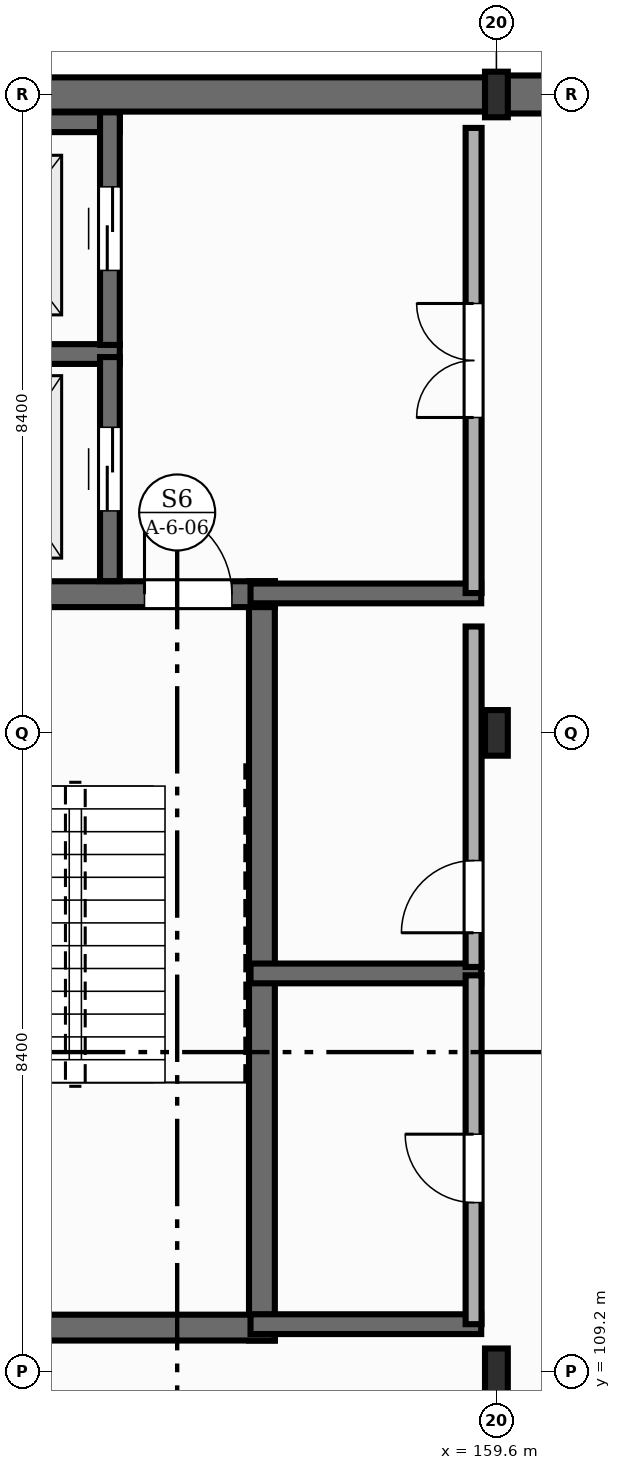
"""IFC4 building model, lengths in metres.
Left out: names, types, materials, properties, quantities, classifications, styles, units other than length and angle.
Written with IfcOpenShell. Run it as: python <this file> out.ifc"""

import sys

from ifc_helpers import new_model, si_unit, direction, frame, frame_2d, origin, origin_2d, place, context, subcontext, project, spatial, rectangle, i_section, extrude, element, fill, save


model = new_model("IFC4")
c1 = context("Model", 3, precision=1e-05, world=origin(), true_north=direction((0.0, 1.0)))
c2 = subcontext(c1, "Body", "Model", "MODEL_VIEW")
j1 = project(units=[si_unit("LENGTHUNIT", "METRE"), si_unit("PLANEANGLEUNIT", "RADIAN")], contexts=[c1])
p1 = place(None, origin())
s1 = spatial("IfcSite", under=j1, at=p1, CompositionType="ELEMENT")
p2 = place(p1, origin())
s2 = spatial("IfcBuilding", under=s1, at=p2, CompositionType="ELEMENT")
p3 = place(p2, frame((0.0, 0.0, -4.5)))
s3 = spatial("IfcBuildingStorey", under=s2, at=p3, CompositionType="ELEMENT", Elevation=-4.5)
for number, where, z_axis, x_axis in (
    (1, (159.6, 109.2, 0.0), (0.0, 0.0, 1.0), (1.0, 0.0, 0.0)),
    (2, (159.6, 117.6, 0.0), (0.0, 0.0, 1.0), (1.0, 0.0, 0.0)),
    (3, (159.6, 126.0, 0.0), (0.0, 0.0, 1.0), (1.0, 0.0, 0.0)),
):
    element("IfcColumn", number, at=place(p3, frame(where, z_axis=z_axis, x_axis=x_axis)), inside=s3, PredefinedType="COLUMN", context=c2, shape_type="SweptSolid", body=[
        extrude(i_section(OverallWidth=0.3, OverallDepth=0.6, WebThickness=0.015, FlangeThickness=0.03, FilletRadius=0.027, at=origin_2d()), origin(), (0.0, 0.0, 1.0), 4.5),
    ])
p4 = place(p3, frame((167.992, 126.0, 0.0), z_axis=(0.0, 0.0, 1.0), x_axis=(-1.0, 0.0, 0.0)))
e4 = element("IfcWall", 4, at=p4, inside=s3, PredefinedType="USERDEFINED", context=c2, shape_type="SweptSolid", body=[
    extrude(rectangle(XDim=8.384, YDim=0.5, at=frame_2d((4.192, 0.0))), origin(), (0.0, 0.0, 1.0), 4.25),
])
p5 = place(p3, frame((159.592, 126.0, 0.0), z_axis=(0.0, 0.0, 1.0), x_axis=(-1.0, 0.0, 0.0)))
e5 = element("IfcWall", 5, at=p5, inside=s3, PredefinedType="USERDEFINED", context=c2, shape_type="SweptSolid", body=[
    extrude(rectangle(XDim=8.384, YDim=0.45, at=frame_2d((4.192, 0.0))), origin(), (0.0, 0.0, 1.0), 4.25),
])
p6 = place(p3, frame((156.515, 109.605, 0.0), z_axis=(0.0, 0.0, 1.0), x_axis=(0.0, 1.0, 0.0)))
e6 = element("IfcWall", 6, at=p6, inside=s3, PredefinedType="SHEAR", context=c2, shape_type="SweptSolid", body=[
    extrude(rectangle(XDim=9.99, YDim=0.34, at=frame_2d((4.995, 0.0))), origin(), (0.0, 0.0, 1.0), 4.25),
])
p7 = place(p3, frame((151.435, 109.775, 0.0), z_axis=(0.0, 0.0, 1.0), x_axis=(1.0, 0.0, 0.0)))
e7 = element("IfcWall", 7, at=p7, inside=s3, PredefinedType="SHEAR", context=c2, shape_type="SweptSolid", body=[
    extrude(rectangle(XDim=5.25, YDim=0.34, at=frame_2d((2.625, 0.0))), origin(), (0.0, 0.0, 1.0), 4.25),
])
p8 = place(p3, frame((151.435, 119.425, 0.0), z_axis=(0.0, 0.0, 1.0), x_axis=(1.0, 0.0, 0.0)))
e8 = element("IfcWall", 8, at=p8, inside=s3, PredefinedType="SHEAR", context=c2, shape_type="SweptSolid", body=[
    extrude(rectangle(XDim=5.25, YDim=0.34, at=frame_2d((2.625, 0.0))), origin(), (0.0, 0.0, 1.0), 4.25),
])
p9 = place(p8, frame((3.535, 0.0, 0.0)))
e9 = element("IfcOpeningElement", 9, at=p9, cuts=e8, PredefinedType="OPENING", context=c2, shape_type="SweptSolid", body=[
    extrude(rectangle(XDim=1.15, YDim=2.15, at=frame_2d((0.575, 1.075))), frame((0.0, 0.18, 0.0), z_axis=(0.0, -1.0, 0.0), x_axis=(1.0, 0.0, 0.0)), (0.0, 0.0, 1.0), 0.36),
])
p10 = place(p3, frame((151.515, 122.585, 0.0), z_axis=(0.0, 0.0, 1.0), x_axis=(1.0, 0.0, 0.0)))
e10 = element("IfcWall", 10, at=p10, inside=s3, PredefinedType="SHEAR", context=c2, shape_type="SweptSolid", body=[
    extrude(rectangle(XDim=3.13, YDim=0.26, at=frame_2d((1.565, 0.0))), origin(), (0.0, 0.0, 1.0), 4.25),
])
p11 = place(p3, frame((154.515, 119.597, 0.0), z_axis=(0.0, 0.0, 1.0), x_axis=(0.0, 1.0, 0.0)))
e11 = element("IfcWall", 11, at=p11, inside=s3, PredefinedType="SHEAR", context=c2, shape_type="SweptSolid", body=[
    extrude(rectangle(XDim=2.948, YDim=0.26, at=frame_2d((1.474, 0.0))), origin(), (0.0, 0.0, 1.0), 4.25),
])
p12 = place(p11, frame((0.924, 0.0, 0.0)))
e12 = element("IfcOpeningElement", 12, at=p12, cuts=e11, PredefinedType="OPENING", context=c2, shape_type="SweptSolid", body=[
    extrude(rectangle(XDim=1.1, YDim=2.15, at=frame_2d((0.55, 1.075))), frame((0.0, 0.14, 0.0), z_axis=(0.0, -1.0, 0.0), x_axis=(1.0, 0.0, 0.0)), (0.0, 0.0, 1.0), 0.28),
])
p13 = place(p3, frame((151.515, 125.635, 0.0), z_axis=(0.0, 0.0, 1.0), x_axis=(1.0, 0.0, 0.0)))
e13 = element("IfcWall", 13, at=p13, inside=s3, PredefinedType="SHEAR", context=c2, shape_type="SweptSolid", body=[
    extrude(rectangle(XDim=3.13, YDim=0.26, at=frame_2d((1.565, 0.0))), origin(), (0.0, 0.0, 1.0), 4.25),
])
p14 = place(p3, frame((154.515, 122.705, 0.0), z_axis=(0.0, 0.0, 1.0), x_axis=(0.0, 1.0, 0.0)))
e14 = element("IfcWall", 14, at=p14, inside=s3, PredefinedType="SHEAR", context=c2, shape_type="SweptSolid", body=[
    extrude(rectangle(XDim=3.06, YDim=0.26, at=frame_2d((1.53, 0.0))), origin(), (0.0, 0.0, 1.0), 4.25),
])
p15 = place(p14, frame((0.98, 0.0, 0.0)))
e15 = element("IfcOpeningElement", 15, at=p15, cuts=e14, PredefinedType="OPENING", context=c2, shape_type="SweptSolid", body=[
    extrude(rectangle(XDim=1.1, YDim=2.15, at=frame_2d((0.55, 1.075))), frame((0.0, 0.14, 0.0), z_axis=(0.0, -1.0, 0.0), x_axis=(1.0, 0.0, 0.0)), (0.0, 0.0, 1.0), 0.28),
])
for number, where, z_axis, x_axis in (
    (16, (156.365, 109.82, 0.0), (0.0, 0.0, 1.0), (1.0, 0.0, 0.0)),
    (17, (156.365, 114.435, 0.0), (0.0, 0.0, 1.0), (1.0, 0.0, 0.0)),
    (18, (156.365, 119.435, 0.0), (0.0, 0.0, 1.0), (1.0, 0.0, 0.0)),
):
    element("IfcWall", number, at=place(p3, frame(where, z_axis=z_axis, x_axis=x_axis)), inside=s3, PredefinedType="SHEAR", context=c2, shape_type="SweptSolid", body=[
        extrude(rectangle(XDim=3.035, YDim=0.26, at=frame_2d((1.518, 0.0))), origin(), (0.0, 0.0, 1.0), 4.25),
    ])
p16 = place(p3, frame((159.3, 109.82, 0.0), z_axis=(0.0, 0.0, 1.0), x_axis=(0.0, 1.0, 0.0)))
e19 = element("IfcWall", 19, at=p16, inside=s3, PredefinedType="STANDARD", context=c2, shape_type="SweptSolid", body=[
    extrude(rectangle(XDim=4.59, YDim=0.21, at=frame_2d((2.295, 0.0))), origin(), (0.0, 0.0, 1.0), 3.882),
])
p17 = place(p16, frame((1.6, 0.0, 0.0)))
e20 = element("IfcOpeningElement", 20, at=p17, cuts=e19, PredefinedType="OPENING", context=c2, shape_type="SweptSolid", body=[
    extrude(rectangle(XDim=0.9, YDim=2.1, at=frame_2d((0.45, 1.05))), frame((0.0, 0.115, 0.0), z_axis=(0.0, -1.0, 0.0), x_axis=(1.0, 0.0, 0.0)), (0.0, 0.0, 1.0), 0.23),
])
p18 = place(p3, frame((159.3, 114.52, 0.0), z_axis=(0.0, 0.0, 1.0), x_axis=(0.0, 1.0, 0.0)))
e21 = element("IfcWall", 21, at=p18, inside=s3, PredefinedType="STANDARD", context=c2, shape_type="SweptSolid", body=[
    extrude(rectangle(XDim=4.48, YDim=0.21, at=frame_2d((2.24, 0.0))), origin(), (0.0, 0.0, 1.0), 3.882),
])
p19 = place(p18, frame((0.45, 0.0, 0.0)))
e22 = element("IfcOpeningElement", 22, at=p19, cuts=e21, PredefinedType="OPENING", context=c2, shape_type="SweptSolid", body=[
    extrude(rectangle(XDim=0.95, YDim=2.15, at=frame_2d((0.475, 1.075))), frame((0.0, 0.115, 0.0), z_axis=(0.0, -1.0, 0.0), x_axis=(1.0, 0.0, 0.0)), (0.0, 0.0, 1.0), 0.23),
])
p20 = place(p3, frame((159.3, 119.44, 0.0), z_axis=(0.0, 0.0, 1.0), x_axis=(0.0, 1.0, 0.0)))
e23 = element("IfcWall", 23, at=p20, inside=s3, PredefinedType="STANDARD", context=c2, shape_type="SweptSolid", body=[
    extrude(rectangle(XDim=6.12, YDim=0.21, at=frame_2d((3.06, 0.0))), origin(), (0.0, 0.0, 1.0), 3.922),
])
p21 = place(p20, frame((2.31, 0.0, 0.0)))
e24 = element("IfcOpeningElement", 24, at=p21, cuts=e23, PredefinedType="OPENING", context=c2, shape_type="SweptSolid", body=[
    extrude(rectangle(XDim=1.5, YDim=2.2, at=frame_2d((0.75, 1.1))), frame((0.0, 0.115, 0.0), z_axis=(0.0, -1.0, 0.0), x_axis=(1.0, 0.0, 0.0)), (0.0, 0.0, 1.0), 0.23),
])
p22 = place(p9, origin())
e25 = element("IfcDoor", 25, at=p22, inside=s3, OperationType="SINGLE_SWING_LEFT", PredefinedType="DOOR", context=c2, shape_type="SweptSolid", body=[
    extrude(rectangle(XDim=1.15, YDim=2.15, at=frame_2d((0.575, 1.075))), frame((0.0, 0.025, 0.0), z_axis=(0.0, -1.0, 0.0), x_axis=(1.0, 0.0, 0.0)), (0.0, 0.0, 1.0), 0.05),
])
fill(e9, e25)
p23 = place(p12, origin())
e26 = element("IfcDoor", 26, at=p23, inside=s3, OperationType="DOUBLE_DOOR_SLIDING", PredefinedType="DOOR", context=c2, shape_type="SweptSolid", body=[
    extrude(rectangle(XDim=1.1, YDim=2.15, at=frame_2d((0.55, 1.075))), frame((0.0, 0.025, 0.0), z_axis=(0.0, -1.0, 0.0), x_axis=(1.0, 0.0, 0.0)), (0.0, 0.0, 1.0), 0.05),
])
fill(e12, e26)
p24 = place(p15, origin())
e27 = element("IfcDoor", 27, at=p24, inside=s3, OperationType="DOUBLE_DOOR_SLIDING", PredefinedType="DOOR", context=c2, shape_type="SweptSolid", body=[
    extrude(rectangle(XDim=1.1, YDim=2.15, at=frame_2d((0.55, 1.075))), frame((0.0, 0.025, 0.0), z_axis=(0.0, -1.0, 0.0), x_axis=(1.0, 0.0, 0.0)), (0.0, 0.0, 1.0), 0.05),
])
fill(e15, e27)
p25 = place(p17, origin())
e28 = element("IfcDoor", 28, at=p25, inside=s3, OperationType="SINGLE_SWING_RIGHT", PredefinedType="DOOR", context=c2, shape_type="SweptSolid", body=[
    extrude(rectangle(XDim=0.9, YDim=2.1, at=frame_2d((0.45, 1.05))), frame((0.0, 0.025, 0.0), z_axis=(0.0, -1.0, 0.0), x_axis=(1.0, 0.0, 0.0)), (0.0, 0.0, 1.0), 0.05),
])
fill(e20, e28)
p26 = place(p19, origin())
e29 = element("IfcDoor", 29, at=p26, inside=s3, OperationType="SINGLE_SWING_LEFT", PredefinedType="DOOR", context=c2, shape_type="SweptSolid", body=[
    extrude(rectangle(XDim=0.95, YDim=2.15, at=frame_2d((0.475, 1.075))), frame((0.0, 0.025, 0.0), z_axis=(0.0, -1.0, 0.0), x_axis=(1.0, 0.0, 0.0)), (0.0, 0.0, 1.0), 0.05),
])
fill(e22, e29)
p27 = place(p21, origin())
e30 = element("IfcDoor", 30, at=p27, inside=s3, OperationType="DOUBLE_DOOR_SINGLE_SWING", PredefinedType="DOOR", context=c2, shape_type="SweptSolid", body=[
    extrude(rectangle(XDim=1.5, YDim=2.2, at=frame_2d((0.75, 1.1))), frame((0.0, 0.025, 0.0), z_axis=(0.0, -1.0, 0.0), x_axis=(1.0, 0.0, 0.0)), (0.0, 0.0, 1.0), 0.05),
])
fill(e24, e30)
save(model, sys.argv[1])
